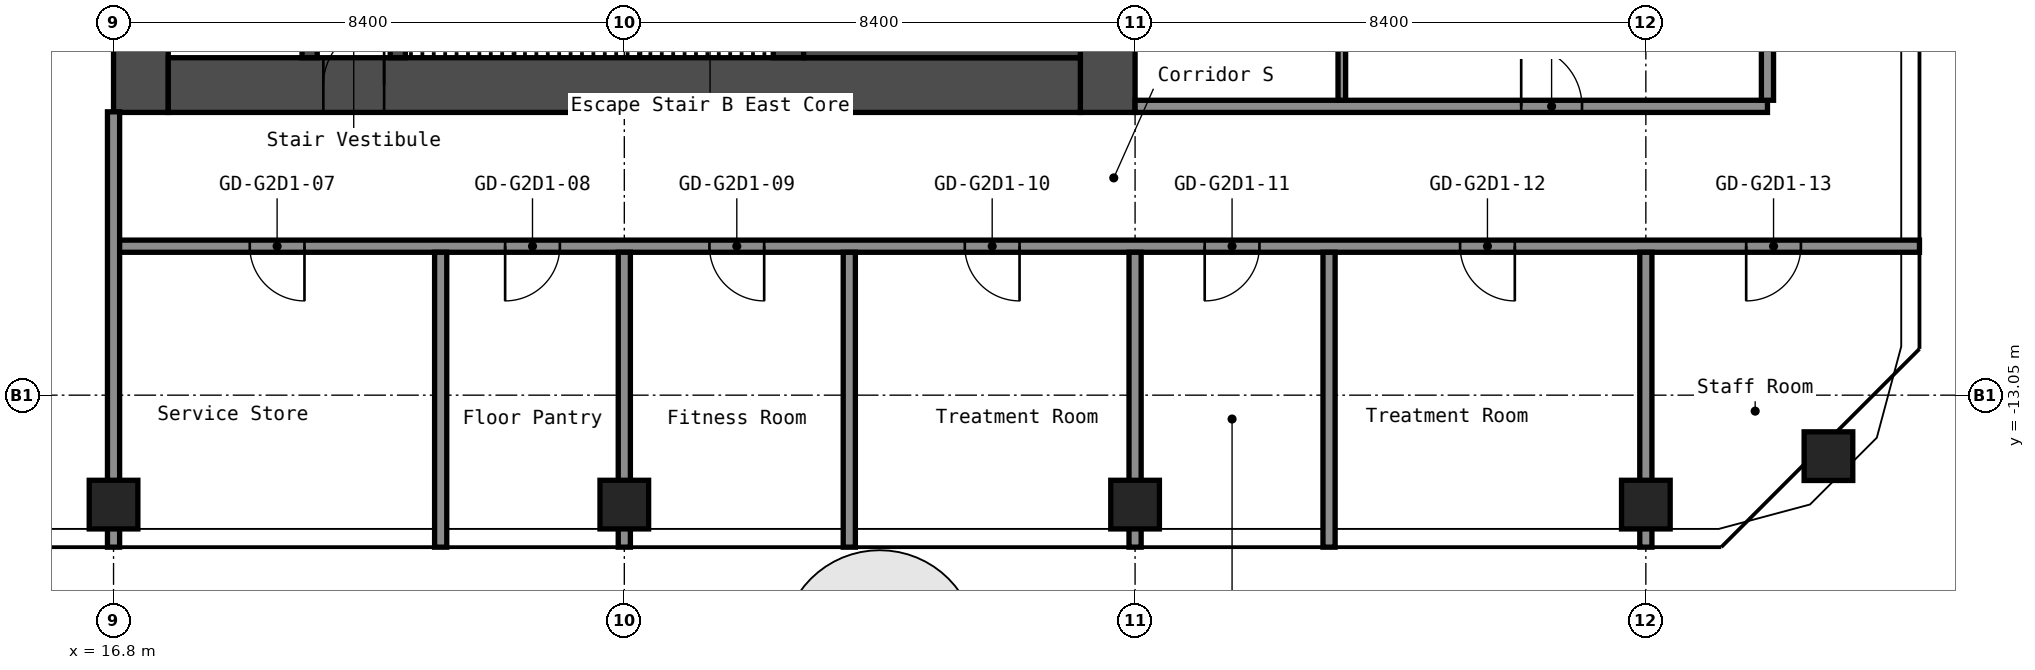
"""IFC4 building model, lengths in metres.
Left out: names, types, materials, properties, quantities, classifications, styles, units other than length and angle.
Written with IfcOpenShell. Run it as: python <this file> out.ifc"""

import sys

from ifc_helpers import new_model, si_unit, direction, frame, frame_2d, origin, origin_2d, place, context, subcontext, project, spatial, rectangle, hollow_rectangle, extrude, element, fill, save


model = new_model("IFC4")
c1 = context("Model", 3, precision=1e-05, world=origin(), true_north=direction((0.0, 1.0)))
c2 = subcontext(c1, "Body", "Model", "MODEL_VIEW")
j1 = project(units=[si_unit("LENGTHUNIT", "METRE"), si_unit("PLANEANGLEUNIT", "RADIAN")], contexts=[c1])
p1 = place(None, origin())
s1 = spatial("IfcSite", under=j1, at=p1, CompositionType="ELEMENT")
p2 = place(p1, origin())
s2 = spatial("IfcBuilding", under=s1, at=p2, CompositionType="ELEMENT")
p3 = place(p2, frame((0.0, 0.0, 101.0)))
s3 = spatial("IfcBuildingStorey", under=s2, at=p3, CompositionType="ELEMENT", Elevation=101.0)
for number, where, z_axis, x_axis in (
    (1, (16.8, -14.85, 0.0), (0.0, 0.0, 1.0), (1.0, 0.0, 0.0)),
    (2, (25.2, -14.85, 0.0), (0.0, 0.0, 1.0), (1.0, 0.0, 0.0)),
    (3, (33.6, -14.85, 0.0), (0.0, 0.0, 1.0), (1.0, 0.0, 0.0)),
    (4, (42.0, -14.85, 0.0), (0.0, 0.0, 1.0), (1.0, 0.0, 0.0)),
    (5, (45.003, -14.053, 0.0), (0.0, 0.0, 1.0), (1.0, 0.0, 0.0)),
):
    element("IfcColumn", number, at=place(p3, frame(where, z_axis=z_axis, x_axis=x_axis)), inside=s3, PredefinedType="COLUMN", context=c2, shape_type="SweptSolid", body=[
        extrude(hollow_rectangle(XDim=0.8, YDim=0.8, WallThickness=0.032, at=origin_2d()), origin(), (0.0, 0.0, 1.0), 2.8),
    ])
p4 = place(p3, frame((17.25, -8.4, 0.0), z_axis=(0.0, 0.0, 1.0), x_axis=(0.0, 1.0, 0.0)))
e6 = element("IfcWall", 6, at=p4, inside=s3, PredefinedType="SHEAR", context=c2, shape_type="SweptSolid", body=[
    extrude(rectangle(XDim=16.8, YDim=0.9, at=frame_2d((8.4, 0.0))), origin(), (0.0, 0.0, 1.0), 2.8),
])
p5 = place(p4, frame((7.6, 0.0, 0.0)))
e7 = element("IfcOpeningElement", 7, at=p5, cuts=e6, PredefinedType="OPENING", context=c2, shape_type="SweptSolid", body=[
    extrude(rectangle(XDim=1.2, YDim=2.1, at=frame_2d((0.6, 1.05))), frame((0.0, 0.46, 0.0), z_axis=(0.0, -1.0, 0.0), x_axis=(1.0, 0.0, 0.0)), (0.0, 0.0, 1.0), 0.92),
])
p6 = place(p3, frame((33.15, -8.4, 0.0), z_axis=(0.0, 0.0, 1.0), x_axis=(0.0, 1.0, 0.0)))
e8 = element("IfcWall", 8, at=p6, inside=s3, PredefinedType="SHEAR", context=c2, shape_type="SweptSolid", body=[
    extrude(rectangle(XDim=16.8, YDim=0.9, at=frame_2d((8.4, 0.0))), origin(), (0.0, 0.0, 1.0), 2.8),
])
p7 = place(p3, frame((17.7, -7.95, 0.0), z_axis=(0.0, 0.0, 1.0), x_axis=(1.0, 0.0, 0.0)))
e9 = element("IfcWall", 9, at=p7, inside=s3, PredefinedType="SHEAR", context=c2, shape_type="SweptSolid", body=[
    extrude(rectangle(XDim=15.0, YDim=0.9, at=frame_2d((7.5, 0.0))), origin(), (0.0, 0.0, 1.0), 2.8),
])
p8 = place(p7, frame((2.55, 0.0, 0.0)))
e10 = element("IfcOpeningElement", 10, at=p8, cuts=e9, PredefinedType="OPENING", context=c2, shape_type="SweptSolid", body=[
    extrude(rectangle(XDim=1.0, YDim=2.1, at=frame_2d((0.5, 1.05))), frame((0.0, 0.46, 0.0), z_axis=(0.0, -1.0, 0.0), x_axis=(1.0, 0.0, 0.0)), (0.0, 0.0, 1.0), 0.92),
])
p9 = place(p3, frame((20.025, -7.5, 0.0), z_axis=(0.0, 0.0, 1.0), x_axis=(0.0, 1.0, 0.0)))
e11 = element("IfcWall", 11, at=p9, inside=s3, PredefinedType="SHEAR", context=c2, shape_type="SweptSolid", body=[
    extrude(rectangle(XDim=6.3, YDim=0.25, at=frame_2d((3.15, 0.0))), origin(), (0.0, 0.0, 1.0), 2.8),
])
p10 = place(p9, frame((2.4, 0.0, 0.0)))
e12 = element("IfcOpeningElement", 12, at=p10, cuts=e11, PredefinedType="OPENING", context=c2, shape_type="SweptSolid", body=[
    extrude(rectangle(XDim=1.0, YDim=2.1, at=frame_2d((0.5, 1.05))), frame((0.0, 0.135, 0.0), z_axis=(0.0, -1.0, 0.0), x_axis=(1.0, 0.0, 0.0)), (0.0, 0.0, 1.0), 0.27),
])
p11 = place(p3, frame((21.475, -7.5, 0.0), z_axis=(0.0, 0.0, 1.0), x_axis=(0.0, 1.0, 0.0)))
e13 = element("IfcWall", 13, at=p11, inside=s3, PredefinedType="SHEAR", context=c2, shape_type="SweptSolid", body=[
    extrude(rectangle(XDim=3.75, YDim=0.25, at=frame_2d((1.875, 0.0))), origin(), (0.0, 0.0, 1.0), 2.8),
])
p12 = place(p11, frame((1.3, 0.0, 0.0)))
e14 = element("IfcOpeningElement", 14, at=p12, cuts=e13, PredefinedType="OPENING", context=c2, shape_type="SweptSolid", body=[
    extrude(rectangle(XDim=1.2, YDim=2.1, at=frame_2d((0.6, 1.05))), frame((0.0, 0.135, 0.0), z_axis=(0.0, -1.0, 0.0), x_axis=(1.0, 0.0, 0.0)), (0.0, 0.0, 1.0), 0.27),
])
p13 = place(p3, frame((27.9, -7.5, 0.0), z_axis=(0.0, 0.0, 1.0), x_axis=(0.0, 1.0, 0.0)))
e15 = element("IfcWall", 15, at=p13, inside=s3, PredefinedType="SHEAR", context=c2, shape_type="SweptSolid", body=[
    extrude(rectangle(XDim=3.75, YDim=0.5, at=frame_2d((1.875, 0.0))), origin(), (0.0, 0.0, 1.0), 2.8),
])
p14 = place(p3, frame((28.15, -6.75, 0.0), z_axis=(0.0, 0.0, 1.0), x_axis=(1.0, 0.0, 0.0)))
e16 = element("IfcWall", 16, at=p14, inside=s3, PredefinedType="SHEAR", context=c2, shape_type="SweptSolid", body=[
    extrude(rectangle(XDim=4.55, YDim=1.5, at=frame_2d((2.275, 0.0))), origin(), (0.0, 0.0, 1.0), 2.8),
])
p15 = place(p3, frame((16.8, -10.6, 0.0), z_axis=(0.0, 0.0, 1.0), x_axis=(1.0, 0.0, 0.0)))
e17 = element("IfcWall", 17, at=p15, inside=s3, PredefinedType="PARTITIONING", context=c2, shape_type="SweptSolid", body=[
    extrude(rectangle(XDim=29.7, YDim=0.2, at=frame_2d((14.85, 0.0))), origin(), (0.0, 0.0, 1.0), 2.8),
])
p16 = place(p15, frame((2.24, 0.0, 0.0)))
e18 = element("IfcOpeningElement", 18, at=p16, cuts=e17, PredefinedType="OPENING", context=c2, shape_type="SweptSolid", body=[
    extrude(rectangle(XDim=0.9, YDim=2.1, at=frame_2d((0.45, 1.05))), frame((0.0, 0.11, 0.0), z_axis=(0.0, -1.0, 0.0), x_axis=(1.0, 0.0, 0.0)), (0.0, 0.0, 1.0), 0.22),
])
p17 = place(p15, frame((6.44, 0.0, 0.0)))
e19 = element("IfcOpeningElement", 19, at=p17, cuts=e17, PredefinedType="OPENING", context=c2, shape_type="SweptSolid", body=[
    extrude(rectangle(XDim=0.9, YDim=2.1, at=frame_2d((0.45, 1.05))), frame((0.0, 0.11, 0.0), z_axis=(0.0, -1.0, 0.0), x_axis=(1.0, 0.0, 0.0)), (0.0, 0.0, 1.0), 0.22),
])
p18 = place(p15, frame((9.8, 0.0, 0.0)))
e20 = element("IfcOpeningElement", 20, at=p18, cuts=e17, PredefinedType="OPENING", context=c2, shape_type="SweptSolid", body=[
    extrude(rectangle(XDim=0.9, YDim=2.1, at=frame_2d((0.45, 1.05))), frame((0.0, 0.11, 0.0), z_axis=(0.0, -1.0, 0.0), x_axis=(1.0, 0.0, 0.0)), (0.0, 0.0, 1.0), 0.22),
])
p19 = place(p15, frame((14.0, 0.0, 0.0)))
e21 = element("IfcOpeningElement", 21, at=p19, cuts=e17, PredefinedType="OPENING", context=c2, shape_type="SweptSolid", body=[
    extrude(rectangle(XDim=0.9, YDim=2.1, at=frame_2d((0.45, 1.05))), frame((0.0, 0.11, 0.0), z_axis=(0.0, -1.0, 0.0), x_axis=(1.0, 0.0, 0.0)), (0.0, 0.0, 1.0), 0.22),
])
p20 = place(p15, frame((17.945, 0.0, 0.0)))
e22 = element("IfcOpeningElement", 22, at=p20, cuts=e17, PredefinedType="OPENING", context=c2, shape_type="SweptSolid", body=[
    extrude(rectangle(XDim=0.9, YDim=2.1, at=frame_2d((0.45, 1.05))), frame((0.0, 0.11, 0.0), z_axis=(0.0, -1.0, 0.0), x_axis=(1.0, 0.0, 0.0)), (0.0, 0.0, 1.0), 0.22),
])
p21 = place(p15, frame((22.145, 0.0, 0.0)))
e23 = element("IfcOpeningElement", 23, at=p21, cuts=e17, PredefinedType="OPENING", context=c2, shape_type="SweptSolid", body=[
    extrude(rectangle(XDim=0.9, YDim=2.1, at=frame_2d((0.45, 1.05))), frame((0.0, 0.11, 0.0), z_axis=(0.0, -1.0, 0.0), x_axis=(1.0, 0.0, 0.0)), (0.0, 0.0, 1.0), 0.22),
])
p22 = place(p15, frame((26.85, 0.0, 0.0)))
e24 = element("IfcOpeningElement", 24, at=p22, cuts=e17, PredefinedType="OPENING", context=c2, shape_type="SweptSolid", body=[
    extrude(rectangle(XDim=0.9, YDim=2.1, at=frame_2d((0.45, 1.05))), frame((0.0, 0.11, 0.0), z_axis=(0.0, -1.0, 0.0), x_axis=(1.0, 0.0, 0.0)), (0.0, 0.0, 1.0), 0.22),
])
p23 = place(p3, frame((33.6, -8.3, 0.0), z_axis=(0.0, 0.0, 1.0), x_axis=(1.0, 0.0, 0.0)))
e25 = element("IfcWall", 25, at=p23, inside=s3, PredefinedType="PARTITIONING", context=c2, shape_type="SweptSolid", body=[
    extrude(rectangle(XDim=10.4, YDim=0.2, at=frame_2d((5.2, 0.0))), origin(), (0.0, 0.0, 1.0), 2.8),
])
p24 = place(p23, frame((6.35, 0.0, 0.0)))
e26 = element("IfcOpeningElement", 26, at=p24, cuts=e25, PredefinedType="OPENING", context=c2, shape_type="SweptSolid", body=[
    extrude(rectangle(XDim=1.0, YDim=2.1, at=frame_2d((0.5, 1.05))), frame((0.0, 0.11, 0.0), z_axis=(0.0, -1.0, 0.0), x_axis=(1.0, 0.0, 0.0)), (0.0, 0.0, 1.0), 0.22),
])
p25 = place(p3, frame((16.8, -15.55, 0.0), z_axis=(0.0, 0.0, 1.0), x_axis=(0.0, 1.0, 0.0)))
e27 = element("IfcWall", 27, at=p25, inside=s3, PredefinedType="PARTITIONING", context=c2, shape_type="SweptSolid", body=[
    extrude(rectangle(XDim=7.16, YDim=0.2, at=frame_2d((3.58, 0.0))), origin(), (0.0, 0.0, 1.0), 2.8),
])
for number, where, z_axis, x_axis in (
    (28, (22.18, -15.55, 0.0), (0.0, 0.0, 1.0), (0.0, 1.0, 0.0)),
    (29, (25.2, -15.55, 0.0), (0.0, 0.0, 1.0), (0.0, 1.0, 0.0)),
    (30, (28.9, -15.55, 0.0), (0.0, 0.0, 1.0), (0.0, 1.0, 0.0)),
    (31, (33.6, -15.55, 0.0), (0.0, 0.0, 1.0), (0.0, 1.0, 0.0)),
    (32, (36.79, -15.55, 0.0), (0.0, 0.0, 1.0), (0.0, 1.0, 0.0)),
):
    element("IfcWall", number, at=place(p3, frame(where, z_axis=z_axis, x_axis=x_axis)), inside=s3, PredefinedType="PARTITIONING", context=c2, shape_type="SweptSolid", body=[
        extrude(rectangle(XDim=4.85, YDim=0.2, at=frame_2d((2.425, 0.0))), origin(), (0.0, 0.0, 1.0), 2.8),
    ])
p26 = place(p3, frame((37.0, -8.2, 0.0), z_axis=(0.0, 0.0, 1.0), x_axis=(0.0, 1.0, 0.0)))
e33 = element("IfcWall", 33, at=p26, inside=s3, PredefinedType="PARTITIONING", context=c2, shape_type="SweptSolid", body=[
    extrude(rectangle(XDim=3.3, YDim=0.125, at=frame_2d((1.65, 0.0))), origin(), (0.0, 0.0, 1.0), 2.8),
])
p27 = place(p3, frame((42.0, -15.55, 0.0), z_axis=(0.0, 0.0, 1.0), x_axis=(0.0, 1.0, 0.0)))
e34 = element("IfcWall", 34, at=p27, inside=s3, PredefinedType="PARTITIONING", context=c2, shape_type="SweptSolid", body=[
    extrude(rectangle(XDim=4.85, YDim=0.2, at=frame_2d((2.425, 0.0))), origin(), (0.0, 0.0, 1.0), 2.8),
])
p28 = place(p3, frame((44.0, -8.2, 0.0), z_axis=(0.0, 0.0, 1.0), x_axis=(0.0, 1.0, 0.0)))
e35 = element("IfcWall", 35, at=p28, inside=s3, PredefinedType="PARTITIONING", context=c2, shape_type="SweptSolid", body=[
    extrude(rectangle(XDim=16.4, YDim=0.2, at=frame_2d((8.2, 0.0))), origin(), (0.0, 0.0, 1.0), 2.8),
])
p29 = place(p8, origin())
e36 = element("IfcDoor", 36, at=p29, inside=s3, OperationType="SINGLE_SWING_LEFT", PredefinedType="DOOR", context=c2, shape_type="SweptSolid", body=[
    extrude(rectangle(XDim=1.0, YDim=2.1, at=frame_2d((0.5, 1.05))), frame((0.0, 0.025, 0.0), z_axis=(0.0, -1.0, 0.0), x_axis=(1.0, 0.0, 0.0)), (0.0, 0.0, 1.0), 0.05),
])
fill(e10, e36)
p30 = place(p16, origin())
e37 = element("IfcDoor", 37, at=p30, inside=s3, OperationType="SINGLE_SWING_RIGHT", PredefinedType="DOOR", context=c2, shape_type="SweptSolid", body=[
    extrude(rectangle(XDim=0.9, YDim=2.1, at=frame_2d((0.45, 1.05))), frame((0.0, 0.025, 0.0), z_axis=(0.0, -1.0, 0.0), x_axis=(1.0, 0.0, 0.0)), (0.0, 0.0, 1.0), 0.05),
])
fill(e18, e37)
p31 = place(p17, origin())
e38 = element("IfcDoor", 38, at=p31, inside=s3, OperationType="SINGLE_SWING_LEFT", PredefinedType="DOOR", context=c2, shape_type="SweptSolid", body=[
    extrude(rectangle(XDim=0.9, YDim=2.1, at=frame_2d((0.45, 1.05))), frame((0.0, 0.025, 0.0), z_axis=(0.0, -1.0, 0.0), x_axis=(1.0, 0.0, 0.0)), (0.0, 0.0, 1.0), 0.05),
])
fill(e19, e38)
p32 = place(p18, origin())
e39 = element("IfcDoor", 39, at=p32, inside=s3, OperationType="SINGLE_SWING_RIGHT", PredefinedType="DOOR", context=c2, shape_type="SweptSolid", body=[
    extrude(rectangle(XDim=0.9, YDim=2.1, at=frame_2d((0.45, 1.05))), frame((0.0, 0.025, 0.0), z_axis=(0.0, -1.0, 0.0), x_axis=(1.0, 0.0, 0.0)), (0.0, 0.0, 1.0), 0.05),
])
fill(e20, e39)
p33 = place(p19, origin())
e40 = element("IfcDoor", 40, at=p33, inside=s3, OperationType="SINGLE_SWING_RIGHT", PredefinedType="DOOR", context=c2, shape_type="SweptSolid", body=[
    extrude(rectangle(XDim=0.9, YDim=2.1, at=frame_2d((0.45, 1.05))), frame((0.0, 0.025, 0.0), z_axis=(0.0, -1.0, 0.0), x_axis=(1.0, 0.0, 0.0)), (0.0, 0.0, 1.0), 0.05),
])
fill(e21, e40)
p34 = place(p20, origin())
e41 = element("IfcDoor", 41, at=p34, inside=s3, OperationType="SINGLE_SWING_LEFT", PredefinedType="DOOR", context=c2, shape_type="SweptSolid", body=[
    extrude(rectangle(XDim=0.9, YDim=2.1, at=frame_2d((0.45, 1.05))), frame((0.0, 0.025, 0.0), z_axis=(0.0, -1.0, 0.0), x_axis=(1.0, 0.0, 0.0)), (0.0, 0.0, 1.0), 0.05),
])
fill(e22, e41)
p35 = place(p21, origin())
e42 = element("IfcDoor", 42, at=p35, inside=s3, OperationType="SINGLE_SWING_RIGHT", PredefinedType="DOOR", context=c2, shape_type="SweptSolid", body=[
    extrude(rectangle(XDim=0.9, YDim=2.1, at=frame_2d((0.45, 1.05))), frame((0.0, 0.025, 0.0), z_axis=(0.0, -1.0, 0.0), x_axis=(1.0, 0.0, 0.0)), (0.0, 0.0, 1.0), 0.05),
])
fill(e23, e42)
p36 = place(p22, origin())
e43 = element("IfcDoor", 43, at=p36, inside=s3, OperationType="SINGLE_SWING_LEFT", PredefinedType="DOOR", context=c2, shape_type="SweptSolid", body=[
    extrude(rectangle(XDim=0.9, YDim=2.1, at=frame_2d((0.45, 1.05))), frame((0.0, 0.025, 0.0), z_axis=(0.0, -1.0, 0.0), x_axis=(1.0, 0.0, 0.0)), (0.0, 0.0, 1.0), 0.05),
])
fill(e24, e43)
p37 = place(p24, origin())
e44 = element("IfcDoor", 44, at=p37, inside=s3, OperationType="SINGLE_SWING_RIGHT", PredefinedType="DOOR", context=c2, shape_type="SweptSolid", body=[
    extrude(rectangle(XDim=1.0, YDim=2.1, at=frame_2d((0.5, 1.05))), frame((0.0, 0.025, 0.0), z_axis=(0.0, -1.0, 0.0), x_axis=(1.0, 0.0, 0.0)), (0.0, 0.0, 1.0), 0.05),
])
fill(e26, e44)
save(model, sys.argv[1])
